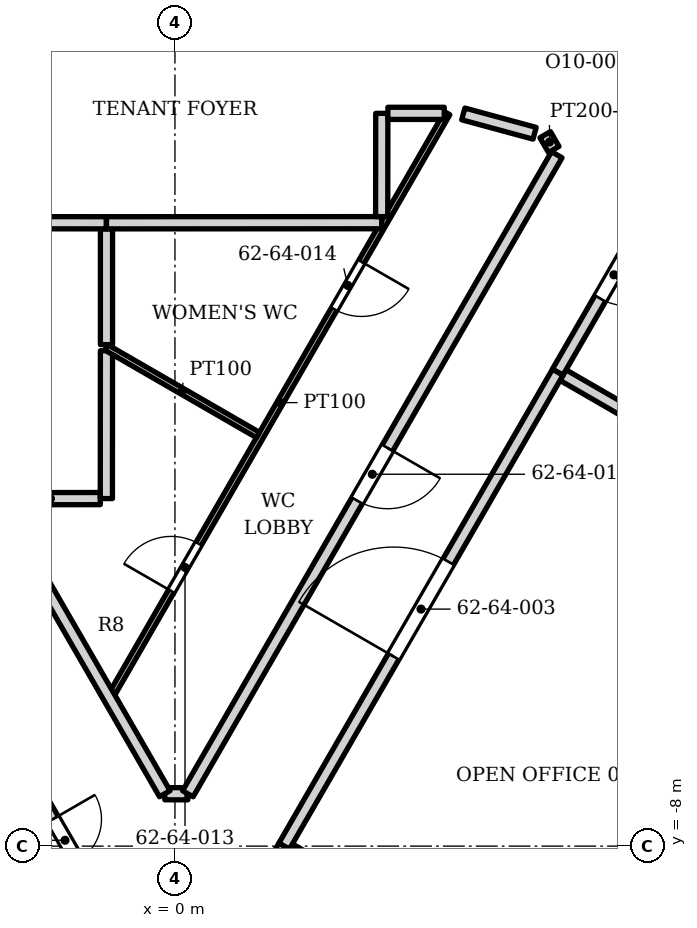
"""IFC4 building model, lengths in metres.
Left out: names, types, materials, properties, quantities, classifications, styles, units other than length and angle.
Written with IfcOpenShell. Run it as: python <this file> out.ifc"""

import sys

from ifc_helpers import new_model, si_unit, direction, frame, frame_2d, origin, place, context, subcontext, project, spatial, rectangle, extrude, element, fill, save


model = new_model("IFC4")
c1 = context("Model", 3, precision=1e-05, world=origin(), true_north=direction((0.0, 1.0)))
c2 = subcontext(c1, "Body", "Model", "MODEL_VIEW")
j1 = project(units=[si_unit("LENGTHUNIT", "METRE"), si_unit("PLANEANGLEUNIT", "RADIAN")], contexts=[c1])
p1 = place(None, origin())
s1 = spatial("IfcSite", under=j1, at=p1, CompositionType="ELEMENT")
p2 = place(p1, origin())
s2 = spatial("IfcBuilding", under=s1, at=p2, CompositionType="ELEMENT")
p3 = place(p2, frame((0.0, 0.0, 259.9)))
s3 = spatial("IfcBuildingStorey", under=s2, at=p3, CompositionType="ELEMENT", Elevation=259.9)
p4 = place(p3, frame((-7.433, 1.839, 0.0), z_axis=(0.0, 0.0, 1.0), x_axis=(0.500005992518, -0.866021943975, 0.0)))
e1 = element("IfcWall", 1, at=p4, inside=s3, PredefinedType="PARTITIONING", context=c2, shape_type="SweptSolid", body=[
    extrude(rectangle(XDim=13.764, YDim=0.2, at=frame_2d((6.882, 0.0))), origin(), (0.0, 0.0, 1.0), 2.884),
])
p5 = place(p4, frame((3.7, 0.0, 0.0)))
e2 = element("IfcOpeningElement", 2, at=p5, cuts=e1, PredefinedType="OPENING", context=c2, shape_type="SweptSolid", body=[
    extrude(rectangle(XDim=1.6, YDim=2.1, at=frame_2d((0.8, 1.05))), frame((0.0, 0.11, 0.0), z_axis=(0.0, -1.0, 0.0), x_axis=(1.0, 0.0, 0.0)), (0.0, 0.0, 1.0), 0.22),
])
p6 = place(p4, frame((10.85, 0.0, 0.0)))
e3 = element("IfcOpeningElement", 3, at=p6, cuts=e1, PredefinedType="OPENING", context=c2, shape_type="SweptSolid", body=[
    extrude(rectangle(XDim=0.8, YDim=2.1, at=frame_2d((0.4, 1.05))), frame((0.0, 0.11, 0.0), z_axis=(0.0, -1.0, 0.0), x_axis=(1.0, 0.0, 0.0)), (0.0, 0.0, 1.0), 0.22),
])
p7 = place(p3, frame((0.594, -10.08, 0.0), z_axis=(0.0, 0.0, 1.0), x_axis=(0.500575540498, 0.865692860231, 0.0)))
e4 = element("IfcWall", 4, at=p7, inside=s3, PredefinedType="PARTITIONING", context=c2, shape_type="SweptSolid", body=[
    extrude(rectangle(XDim=2.403, YDim=0.2, at=frame_2d((1.201, 0.0))), origin(), (0.0, 0.0, 1.0), 3.73),
])
p8 = place(p7, frame((0.854, 0.0, 0.0)))
e5 = element("IfcOpeningElement", 5, at=p8, cuts=e4, PredefinedType="OPENING", context=c2, shape_type="SweptSolid", body=[
    extrude(rectangle(XDim=1.0, YDim=2.1, at=frame_2d((0.5, 1.05))), frame((0.0, 0.11, 0.0), z_axis=(0.0, -1.0, 0.0), x_axis=(1.0, 0.0, 0.0)), (0.0, 0.0, 1.0), 0.22),
])
p9 = place(p3, frame((1.881, -8.05, 0.0), z_axis=(0.0, 0.0, 1.0), x_axis=(0.86614736797, -0.499788692307, 0.0)))
e6 = element("IfcWall", 6, at=p9, inside=s3, PredefinedType="PARTITIONING", context=c2, shape_type="SweptSolid", body=[
    extrude(rectangle(XDim=5.85, YDim=0.2, at=frame_2d((2.925, 0.0))), origin(), (0.0, 0.0, 1.0), 2.884),
])
p10 = place(p3, frame((-0.167, -7.138, 0.0), z_axis=(0.0, 0.0, 1.0), x_axis=(0.999996687272, -0.002573994047, 0.0)))
e7 = element("IfcWall", 7, at=p10, inside=s3, PredefinedType="PARTITIONING", context=c2, shape_type="SweptSolid", body=[
    extrude(rectangle(XDim=0.379, YDim=0.2, at=frame_2d((0.19, 0.0))), origin(), (0.0, 0.0, 1.0), 3.73),
])
p11 = place(p3, frame((0.212, -7.139, 0.0), z_axis=(0.0, 0.0, 1.0), x_axis=(0.499990649477, 0.866030802244, 0.0)))
e8 = element("IfcWall", 8, at=p11, inside=s3, PredefinedType="PARTITIONING", context=c2, shape_type="SweptSolid", body=[
    extrude(rectangle(XDim=12.135, YDim=0.2, at=frame_2d((6.067, 0.0))), origin(), (0.0, 0.0, 1.0), 2.884),
])
p12 = place(p11, frame((5.567, 0.0, 0.0)))
e9 = element("IfcOpeningElement", 9, at=p12, cuts=e8, PredefinedType="OPENING", context=c2, shape_type="SweptSolid", body=[
    extrude(rectangle(XDim=1.0, YDim=2.1, at=frame_2d((0.5, 1.05))), frame((0.0, 0.11, 0.0), z_axis=(0.0, -1.0, 0.0), x_axis=(1.0, 0.0, 0.0)), (0.0, 0.0, 1.0), 0.22),
])
p13 = place(p3, frame((-1.017, -5.465, 0.0), z_axis=(0.0, 0.0, 1.0), x_axis=(0.499983334908, 0.866035025166, 0.0)))
e10 = element("IfcWall", 10, at=p13, inside=s3, PredefinedType="PARTITIONING", context=c2, shape_type="SweptSolid", body=[
    extrude(rectangle(XDim=10.99, YDim=0.1, at=frame_2d((5.495, 0.0))), origin(), (0.0, 0.0, 1.0), 2.884),
])
p14 = place(p13, frame((1.915, 0.0, 0.0)))
e11 = element("IfcOpeningElement", 11, at=p14, cuts=e10, PredefinedType="OPENING", context=c2, shape_type="SweptSolid", body=[
    extrude(rectangle(XDim=0.9, YDim=2.1, at=frame_2d((0.45, 1.05))), frame((0.0, 0.06, 0.0), z_axis=(0.0, -1.0, 0.0), x_axis=(1.0, 0.0, 0.0)), (0.0, 0.0, 1.0), 0.12),
])
p15 = place(p13, frame((7.271, 0.0, 0.0)))
e12 = element("IfcOpeningElement", 12, at=p15, cuts=e10, PredefinedType="OPENING", context=c2, shape_type="SweptSolid", body=[
    extrude(rectangle(XDim=0.9, YDim=2.1, at=frame_2d((0.45, 1.05))), frame((0.0, 0.06, 0.0), z_axis=(0.0, -1.0, 0.0), x_axis=(1.0, 0.0, 0.0)), (0.0, 0.0, 1.0), 0.12),
])
p16 = place(p3, frame((6.382, -0.254, 0.0), z_axis=(0.0, 0.0, 1.0), x_axis=(0.866018092707, -0.500012662943, 0.0)))
e13 = element("IfcWall", 13, at=p16, inside=s3, PredefinedType="PARTITIONING", context=c2, shape_type="SweptSolid", body=[
    extrude(rectangle(XDim=5.85, YDim=0.2, at=frame_2d((2.925, 0.0))), origin(), (0.0, 0.0, 1.0), 3.052),
])
p17 = place(p3, frame((-2.968, -2.287, 0.0), z_axis=(0.0, 0.0, 1.0), x_axis=(0.499996582779, -0.866027376709, 0.0)))
e14 = element("IfcWall", 14, at=p17, inside=s3, PredefinedType="PARTITIONING", context=c2, shape_type="SweptSolid", body=[
    extrude(rectangle(XDim=5.602, YDim=0.2, at=frame_2d((2.801, 0.0))), origin(), (0.0, 0.0, 1.0), 2.884),
])
p18 = place(p3, frame((-2.868, -2.286, 0.0), z_axis=(0.0, 0.0, 1.0), x_axis=(0.999999601047, 0.000893255561, 0.0)))
e15 = element("IfcWall", 15, at=p18, inside=s3, PredefinedType="PARTITIONING", context=c2, shape_type="SweptSolid", body=[
    extrude(rectangle(XDim=1.64, YDim=0.2, at=frame_2d((0.82, 0.0))), origin(), (0.0, 0.0, 1.0), 3.73),
])
p19 = place(p3, frame((1.797, -7.999, 0.0), z_axis=(0.0, 0.0, 1.0), x_axis=(0.5000018851, 0.866024315419, 0.0)))
e16 = element("IfcWall", 16, at=p19, inside=s3, PredefinedType="PARTITIONING", context=c2, shape_type="SweptSolid", body=[
    extrude(rectangle(XDim=9.0, YDim=0.2, at=frame_2d((4.5, 0.0))), origin(), (0.0, 0.0, 1.0), 2.884),
])
p20 = place(p19, frame((3.6, 0.0, 0.0)))
e17 = element("IfcOpeningElement", 17, at=p20, cuts=e16, PredefinedType="OPENING", context=c2, shape_type="SweptSolid", body=[
    extrude(rectangle(XDim=1.8, YDim=2.4, at=frame_2d((0.9, 1.2))), frame((0.0, 0.11, 0.0), z_axis=(0.0, -1.0, 0.0), x_axis=(1.0, 0.0, 0.0)), (0.0, 0.0, 1.0), 0.22),
])
p21 = place(p3, frame((6.295, -0.204, 0.0), z_axis=(0.0, 0.0, 1.0), x_axis=(0.499964815505, 0.866045716609, 0.0)))
e18 = element("IfcWall", 18, at=p21, inside=s3, PredefinedType="PARTITIONING", context=c2, shape_type="SweptSolid", body=[
    extrude(rectangle(XDim=4.331, YDim=0.2, at=frame_2d((2.166, 0.0))), origin(), (0.0, 0.0, 1.0), 3.73),
])
p22 = place(p21, frame((1.397, 0.0, 0.0)))
e19 = element("IfcOpeningElement", 19, at=p22, cuts=e18, PredefinedType="OPENING", context=c2, shape_type="SweptSolid", body=[
    extrude(rectangle(XDim=0.9, YDim=2.1, at=frame_2d((0.45, 1.05))), frame((0.0, 0.11, 0.0), z_axis=(0.0, -1.0, 0.0), x_axis=(1.0, 0.0, 0.0)), (0.0, 0.0, 1.0), 0.22),
])
p23 = place(p3, frame((-1.128, -2.285, 0.0), z_axis=(0.0, 0.0, 1.0), x_axis=(0.000803212592, 0.999999677425, 0.0)))
e20 = element("IfcWall", 20, at=p23, inside=s3, PredefinedType="PARTITIONING", context=c2, shape_type="SweptSolid", body=[
    extrude(rectangle(XDim=2.432, YDim=0.2, at=frame_2d((1.216, 0.0))), origin(), (0.0, 0.0, 1.0), 3.73),
])
p24 = place(p3, frame((-1.128, 0.2, 0.0), z_axis=(0.0, 0.0, 1.0), x_axis=(0.866037287897, -0.499979415547, 0.0)))
e21 = element("IfcWall", 21, at=p24, inside=s3, PredefinedType="PARTITIONING", context=c2, shape_type="SweptSolid", body=[
    extrude(rectangle(XDim=2.878, YDim=0.1, at=frame_2d((1.439, 0.0))), origin(), (0.0, 0.0, 1.0), 2.884),
])
p25 = place(p3, frame((-1.126, 0.247, 0.0), z_axis=(0.0, 0.0, 1.0), x_axis=(0.0, 1.0, 0.0)))
e22 = element("IfcWall", 22, at=p25, inside=s3, PredefinedType="PARTITIONING", context=c2, shape_type="SweptSolid", body=[
    extrude(rectangle(XDim=1.903, YDim=0.2, at=frame_2d((0.952, 0.0))), origin(), (0.0, 0.0, 1.0), 3.73),
])
p26 = place(p3, frame((-3.4, 2.252, 0.0), z_axis=(0.0, 0.0, 1.0), x_axis=(0.999999630572, -0.000859567749, 0.0)))
e23 = element("IfcWall", 23, at=p26, inside=s3, PredefinedType="PARTITIONING", context=c2, shape_type="SweptSolid", body=[
    extrude(rectangle(XDim=2.272, YDim=0.2, at=frame_2d((1.136, 0.0))), origin(), (0.0, 0.0, 1.0), 3.73),
])
p27 = place(p3, frame((-1.126, 2.25, 0.0), z_axis=(0.0, 0.0, 1.0), x_axis=(0.999999906884, 0.000431545973, 0.0)))
e24 = element("IfcWall", 24, at=p27, inside=s3, PredefinedType="PARTITIONING", context=c2, shape_type="SweptSolid", body=[
    extrude(rectangle(XDim=4.526, YDim=0.2, at=frame_2d((2.263, 0.0))), origin(), (0.0, 0.0, 1.0), 3.73),
])
p28 = place(p3, frame((6.09, 3.7, 0.0), z_axis=(0.0, 0.0, 1.0), x_axis=(0.499973348067, -0.866040790738, 0.0)))
e25 = element("IfcWall", 25, at=p28, inside=s3, PredefinedType="PARTITIONING", context=c2, shape_type="SweptSolid", body=[
    extrude(rectangle(XDim=0.281, YDim=0.2, at=frame_2d((0.14, 0.0))), origin(), (0.0, 0.0, 1.0), 3.73),
])
p29 = place(p3, frame((4.742, 4.041, 0.0), z_axis=(0.0, 0.0, 1.0), x_axis=(0.965129144807, -0.261774203931, 0.0)))
e26 = element("IfcWall", 26, at=p29, inside=s3, PredefinedType="PARTITIONING", context=c2, shape_type="SweptSolid", body=[
    extrude(rectangle(XDim=1.215, YDim=0.2, at=frame_2d((0.608, 0.0))), origin(), (0.0, 0.0, 1.0), 2.884),
])
p30 = place(p3, frame((3.4, 2.352, 0.0), z_axis=(0.0, 0.0, 1.0), x_axis=(0.001150085496, 0.999999338651, 0.0)))
e27 = element("IfcWall", 27, at=p30, inside=s3, PredefinedType="PARTITIONING", context=c2, shape_type="SweptSolid", body=[
    extrude(rectangle(XDim=1.698, YDim=0.2, at=frame_2d((0.849, 0.0))), origin(), (0.0, 0.0, 1.0), 3.73),
])
p31 = place(p3, frame((3.502, 4.051, 0.0), z_axis=(0.0, 0.0, 1.0), x_axis=(1.0, 0.0, 0.0)))
e28 = element("IfcWall", 28, at=p31, inside=s3, PredefinedType="PARTITIONING", context=c2, shape_type="SweptSolid", body=[
    extrude(rectangle(XDim=0.927, YDim=0.2, at=frame_2d((0.463, 0.0))), origin(), (0.0, 0.0, 1.0), 2.884),
])
p32 = place(p6, origin())
e29 = element("IfcDoor", 29, at=p32, inside=s3, OperationType="SINGLE_SWING_LEFT", PredefinedType="DOOR", context=c2, shape_type="SweptSolid", body=[
    extrude(rectangle(XDim=0.8, YDim=2.1, at=frame_2d((0.4, 1.05))), frame((0.0, 0.025, 0.0), z_axis=(0.0, -1.0, 0.0), x_axis=(1.0, 0.0, 0.0)), (0.0, 0.0, 1.0), 0.05),
])
fill(e3, e29)
p33 = place(p20, origin())
e30 = element("IfcDoor", 30, at=p33, inside=s3, OperationType="DOUBLE_DOOR_SINGLE_SWING", PredefinedType="DOOR", context=c2, shape_type="SweptSolid", body=[
    extrude(rectangle(XDim=1.8, YDim=2.4, at=frame_2d((0.9, 1.2))), frame((0.0, 0.025, 0.0), z_axis=(0.0, -1.0, 0.0), x_axis=(1.0, 0.0, 0.0)), (0.0, 0.0, 1.0), 0.05),
])
fill(e17, e30)
p34 = place(p22, origin())
e31 = element("IfcDoor", 31, at=p34, inside=s3, OperationType="SINGLE_SWING_RIGHT", PredefinedType="DOOR", context=c2, shape_type="SweptSolid", body=[
    extrude(rectangle(XDim=0.9, YDim=2.1, at=frame_2d((0.45, 1.05))), frame((0.0, 0.025, 0.0), z_axis=(0.0, -1.0, 0.0), x_axis=(1.0, 0.0, 0.0)), (0.0, 0.0, 1.0), 0.05),
])
fill(e19, e31)
p35 = place(p12, origin())
e32 = element("IfcDoor", 32, at=p35, inside=s3, OperationType="SINGLE_SWING_RIGHT", PredefinedType="DOOR", context=c2, shape_type="SweptSolid", body=[
    extrude(rectangle(XDim=1.0, YDim=2.1, at=frame_2d((0.5, 1.05))), frame((0.0, 0.025, 0.0), z_axis=(0.0, -1.0, 0.0), x_axis=(1.0, 0.0, 0.0)), (0.0, 0.0, 1.0), 0.05),
])
fill(e9, e32)
p36 = place(p14, origin())
e33 = element("IfcDoor", 33, at=p36, inside=s3, OperationType="SINGLE_SWING_LEFT", PredefinedType="DOOR", context=c2, shape_type="SweptSolid", body=[
    extrude(rectangle(XDim=0.9, YDim=2.1, at=frame_2d((0.45, 1.05))), frame((0.0, 0.025, 0.0), z_axis=(0.0, -1.0, 0.0), x_axis=(1.0, 0.0, 0.0)), (0.0, 0.0, 1.0), 0.05),
])
fill(e11, e33)
p37 = place(p15, origin())
e34 = element("IfcDoor", 34, at=p37, inside=s3, OperationType="SINGLE_SWING_RIGHT", PredefinedType="DOOR", context=c2, shape_type="SweptSolid", body=[
    extrude(rectangle(XDim=0.9, YDim=2.1, at=frame_2d((0.45, 1.05))), frame((0.0, 0.025, 0.0), z_axis=(0.0, -1.0, 0.0), x_axis=(1.0, 0.0, 0.0)), (0.0, 0.0, 1.0), 0.05),
])
fill(e12, e34)
save(model, sys.argv[1])
